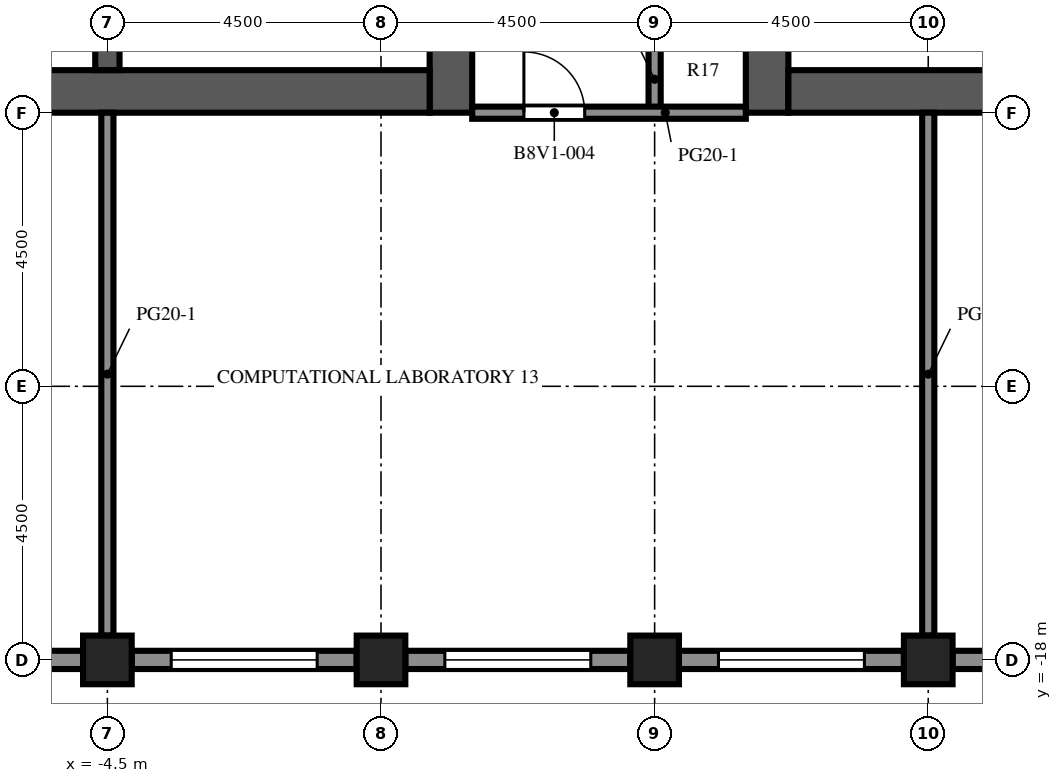
"""IFC4 building model, lengths in metres.
Left out: names, types, materials, properties, quantities, classifications, styles, units other than length and angle.
Written with IfcOpenShell. Run it as: python <this file> out.ifc"""

import sys

from ifc_helpers import new_model, si_unit, direction, frame, frame_2d, origin, origin_2d, place, context, subcontext, project, spatial, rectangle, extrude, element, fill, save


model = new_model("IFC4")
c1 = context("Model", 3, precision=1e-05, world=origin(), true_north=direction((0.0, 1.0)))
c2 = subcontext(c1, "Body", "Model", "MODEL_VIEW")
j1 = project(units=[si_unit("LENGTHUNIT", "METRE"), si_unit("PLANEANGLEUNIT", "RADIAN")], contexts=[c1])
p1 = place(None, origin())
s1 = spatial("IfcSite", under=j1, at=p1, CompositionType="ELEMENT")
p2 = place(p1, origin())
s2 = spatial("IfcBuilding", under=s1, at=p2, CompositionType="ELEMENT")
p3 = place(p2, frame((0.0, 0.0, 274.5)))
s3 = spatial("IfcBuildingStorey", under=s2, at=p3, CompositionType="ELEMENT", Elevation=274.5)
for number, where, z_axis, x_axis in (
    (1, (-4.5, -18.0, 0.0), (0.0, 0.0, 1.0), (1.0, 0.0, 0.0)),
    (2, (0.0, -18.0, 0.0), (0.0, 0.0, 1.0), (1.0, 0.0, 0.0)),
    (3, (4.5, -18.0, 0.0), (0.0, 0.0, 1.0), (1.0, 0.0, 0.0)),
    (4, (9.0, -18.0, 0.0), (0.0, 0.0, 1.0), (1.0, 0.0, 0.0)),
):
    element("IfcColumn", number, at=place(p3, frame(where, z_axis=z_axis, x_axis=x_axis)), inside=s3, PredefinedType="COLUMN", context=c2, shape_type="SweptSolid", body=[
        extrude(rectangle(XDim=0.8, YDim=0.8, at=origin_2d()), origin(), (0.0, 0.0, 1.0), 4.1),
    ])
p4 = place(p3, frame((1.15, -9.0, 0.0), z_axis=(0.0, 0.0, 1.0), x_axis=(0.0, 1.0, 0.0)))
e5 = element("IfcWall", 5, at=p4, inside=s3, PredefinedType="SHEAR", context=c2, shape_type="SweptSolid", body=[
    extrude(rectangle(XDim=27.5, YDim=0.7, at=frame_2d((13.75, 0.0))), origin(), (0.0, 0.0, 1.0), 4.1),
])
p5 = place(p4, frame((12.55, 0.0, 0.0)))
e6 = element("IfcOpeningElement", 6, at=p5, cuts=e5, PredefinedType="OPENING", context=c2, shape_type="SweptSolid", body=[
    extrude(rectangle(XDim=2.4, YDim=2.4, at=frame_2d((1.2, 1.2))), frame((0.0, 0.36, 0.0), z_axis=(0.0, -1.0, 0.0), x_axis=(1.0, 0.0, 0.0)), (0.0, 0.0, 1.0), 0.72),
])
p6 = place(p4, frame((3.9, 0.0, 0.0)))
e7 = element("IfcOpeningElement", 7, at=p6, cuts=e5, PredefinedType="OPENING", context=c2, shape_type="SweptSolid", body=[
    extrude(rectangle(XDim=1.2, YDim=2.1, at=frame_2d((0.6, 1.05))), frame((0.0, 0.36, 0.0), z_axis=(0.0, -1.0, 0.0), x_axis=(1.0, 0.0, 0.0)), (0.0, 0.0, 1.0), 0.72),
])
p7 = place(p4, frame((19.46, 0.0, 0.0)))
e8 = element("IfcOpeningElement", 8, at=p7, cuts=e5, PredefinedType="OPENING", context=c2, shape_type="SweptSolid", body=[
    extrude(rectangle(XDim=1.0, YDim=2.1, at=frame_2d((0.5, 1.05))), frame((0.0, 0.36, 0.0), z_axis=(0.0, -1.0, 0.0), x_axis=(1.0, 0.0, 0.0)), (0.0, 0.0, 1.0), 0.72),
])
p8 = place(p4, frame((21.17, 0.0, 0.0)))
e9 = element("IfcOpeningElement", 9, at=p8, cuts=e5, PredefinedType="OPENING", context=c2, shape_type="SweptSolid", body=[
    extrude(rectangle(XDim=1.0, YDim=2.1, at=frame_2d((0.5, 1.05))), frame((0.0, 0.36, 0.0), z_axis=(0.0, -1.0, 0.0), x_axis=(1.0, 0.0, 0.0)), (0.0, 0.0, 1.0), 0.72),
])
p9 = place(p4, frame((23.26, 0.0, 0.0)))
e10 = element("IfcOpeningElement", 10, at=p9, cuts=e5, PredefinedType="OPENING", context=c2, shape_type="SweptSolid", body=[
    extrude(rectangle(XDim=1.0, YDim=2.1, at=frame_2d((0.5, 1.05))), frame((0.0, 0.36, 0.0), z_axis=(0.0, -1.0, 0.0), x_axis=(1.0, 0.0, 0.0)), (0.0, 0.0, 1.0), 0.72),
])
p10 = place(p4, frame((25.35, 0.0, 0.0)))
e11 = element("IfcOpeningElement", 11, at=p10, cuts=e5, PredefinedType="OPENING", context=c2, shape_type="SweptSolid", body=[
    extrude(rectangle(XDim=1.0, YDim=2.1, at=frame_2d((0.5, 1.05))), frame((0.0, 0.36, 0.0), z_axis=(0.0, -1.0, 0.0), x_axis=(1.0, 0.0, 0.0)), (0.0, 0.0, 1.0), 0.72),
])
p11 = place(p3, frame((-9.8, -8.65, 0.0), z_axis=(0.0, 0.0, 1.0), x_axis=(1.0, 0.0, 0.0)))
e12 = element("IfcWall", 12, at=p11, inside=s3, PredefinedType="SHEAR", context=c2, shape_type="SweptSolid", body=[
    extrude(rectangle(XDim=10.6, YDim=0.7, at=frame_2d((5.3, 0.0))), origin(), (0.0, 0.0, 1.0), 4.1),
])
p12 = place(p3, frame((-4.5, -8.3, 0.0), z_axis=(0.0, 0.0, 1.0), x_axis=(0.0, 1.0, 0.0)))
e13 = element("IfcWall", 13, at=p12, inside=s3, PredefinedType="SHEAR", context=c2, shape_type="SweptSolid", body=[
    extrude(rectangle(XDim=7.6, YDim=0.4, at=frame_2d((3.8, 0.0))), origin(), (0.0, 0.0, 1.0), 4.1),
])
p13 = place(p3, frame((6.35, -9.0, 0.0), z_axis=(0.0, 0.0, 1.0), x_axis=(0.0, 1.0, 0.0)))
e14 = element("IfcWall", 14, at=p13, inside=s3, PredefinedType="SHEAR", context=c2, shape_type="SweptSolid", body=[
    extrude(rectangle(XDim=27.5, YDim=0.7, at=frame_2d((13.75, 0.0))), origin(), (0.0, 0.0, 1.0), 4.1),
])
p14 = place(p13, frame((12.55, 0.0, 0.0)))
e15 = element("IfcOpeningElement", 15, at=p14, cuts=e14, PredefinedType="OPENING", context=c2, shape_type="SweptSolid", body=[
    extrude(rectangle(XDim=2.4, YDim=2.4, at=frame_2d((1.2, 1.2))), frame((0.0, 0.36, 0.0), z_axis=(0.0, -1.0, 0.0), x_axis=(1.0, 0.0, 0.0)), (0.0, 0.0, 1.0), 0.72),
])
p15 = place(p13, frame((3.9, 0.0, 0.0)))
e16 = element("IfcOpeningElement", 16, at=p15, cuts=e14, PredefinedType="OPENING", context=c2, shape_type="SweptSolid", body=[
    extrude(rectangle(XDim=1.2, YDim=2.1, at=frame_2d((0.6, 1.05))), frame((0.0, 0.36, 0.0), z_axis=(0.0, -1.0, 0.0), x_axis=(1.0, 0.0, 0.0)), (0.0, 0.0, 1.0), 0.72),
])
p16 = place(p13, frame((19.46, 0.0, 0.0)))
e17 = element("IfcOpeningElement", 17, at=p16, cuts=e14, PredefinedType="OPENING", context=c2, shape_type="SweptSolid", body=[
    extrude(rectangle(XDim=1.0, YDim=2.1, at=frame_2d((0.5, 1.05))), frame((0.0, 0.36, 0.0), z_axis=(0.0, -1.0, 0.0), x_axis=(1.0, 0.0, 0.0)), (0.0, 0.0, 1.0), 0.72),
])
p17 = place(p13, frame((21.17, 0.0, 0.0)))
e18 = element("IfcOpeningElement", 18, at=p17, cuts=e14, PredefinedType="OPENING", context=c2, shape_type="SweptSolid", body=[
    extrude(rectangle(XDim=1.0, YDim=2.1, at=frame_2d((0.5, 1.05))), frame((0.0, 0.36, 0.0), z_axis=(0.0, -1.0, 0.0), x_axis=(1.0, 0.0, 0.0)), (0.0, 0.0, 1.0), 0.72),
])
p18 = place(p13, frame((23.26, 0.0, 0.0)))
e19 = element("IfcOpeningElement", 19, at=p18, cuts=e14, PredefinedType="OPENING", context=c2, shape_type="SweptSolid", body=[
    extrude(rectangle(XDim=1.0, YDim=2.1, at=frame_2d((0.5, 1.05))), frame((0.0, 0.36, 0.0), z_axis=(0.0, -1.0, 0.0), x_axis=(1.0, 0.0, 0.0)), (0.0, 0.0, 1.0), 0.72),
])
p19 = place(p13, frame((25.35, 0.0, 0.0)))
e20 = element("IfcOpeningElement", 20, at=p19, cuts=e14, PredefinedType="OPENING", context=c2, shape_type="SweptSolid", body=[
    extrude(rectangle(XDim=1.0, YDim=2.1, at=frame_2d((0.5, 1.05))), frame((0.0, 0.36, 0.0), z_axis=(0.0, -1.0, 0.0), x_axis=(1.0, 0.0, 0.0)), (0.0, 0.0, 1.0), 0.72),
])
p20 = place(p3, frame((6.7, -8.65, 0.0), z_axis=(0.0, 0.0, 1.0), x_axis=(1.0, 0.0, 0.0)))
e21 = element("IfcWall", 21, at=p20, inside=s3, PredefinedType="SHEAR", context=c2, shape_type="SweptSolid", body=[
    extrude(rectangle(XDim=10.6, YDim=0.7, at=frame_2d((5.3, 0.0))), origin(), (0.0, 0.0, 1.0), 4.1),
])
p21 = place(p3, frame((-4.9, -18.0, 0.0), z_axis=(0.0, 0.0, 1.0), x_axis=(-1.0, 0.0, 0.0)))
e22 = element("IfcWall", 22, at=p21, inside=s3, PredefinedType="SOLIDWALL", context=c2, shape_type="SweptSolid", body=[
    extrude(rectangle(XDim=3.7, YDim=0.3, at=frame_2d((1.85, 0.0))), origin(), (0.0, 0.0, 1.0), 2.85),
])
p22 = place(p21, frame((0.65, 0.0, 0.8)))
e23 = element("IfcOpeningElement", 23, at=p22, cuts=e22, PredefinedType="OPENING", context=c2, shape_type="SweptSolid", body=[
    extrude(rectangle(XDim=2.4, YDim=1.7, at=frame_2d((1.2, 0.85))), frame((0.0, 0.16, 0.0), z_axis=(0.0, -1.0, 0.0), x_axis=(1.0, 0.0, 0.0)), (0.0, 0.0, 1.0), 0.32),
])
p23 = place(p3, frame((-0.4, -18.0, 0.0), z_axis=(0.0, 0.0, 1.0), x_axis=(-1.0, 0.0, 0.0)))
e24 = element("IfcWall", 24, at=p23, inside=s3, PredefinedType="SOLIDWALL", context=c2, shape_type="SweptSolid", body=[
    extrude(rectangle(XDim=3.7, YDim=0.3, at=frame_2d((1.85, 0.0))), origin(), (0.0, 0.0, 1.0), 2.85),
])
p24 = place(p23, frame((0.65, 0.0, 0.8)))
e25 = element("IfcOpeningElement", 25, at=p24, cuts=e24, PredefinedType="OPENING", context=c2, shape_type="SweptSolid", body=[
    extrude(rectangle(XDim=2.4, YDim=1.7, at=frame_2d((1.2, 0.85))), frame((0.0, 0.16, 0.0), z_axis=(0.0, -1.0, 0.0), x_axis=(1.0, 0.0, 0.0)), (0.0, 0.0, 1.0), 0.32),
])
p25 = place(p3, frame((4.1, -18.0, 0.0), z_axis=(0.0, 0.0, 1.0), x_axis=(-1.0, 0.0, 0.0)))
e26 = element("IfcWall", 26, at=p25, inside=s3, PredefinedType="SOLIDWALL", context=c2, shape_type="SweptSolid", body=[
    extrude(rectangle(XDim=3.7, YDim=0.3, at=frame_2d((1.85, 0.0))), origin(), (0.0, 0.0, 1.0), 2.85),
])
p26 = place(p25, frame((0.65, 0.0, 0.8)))
e27 = element("IfcOpeningElement", 27, at=p26, cuts=e26, PredefinedType="OPENING", context=c2, shape_type="SweptSolid", body=[
    extrude(rectangle(XDim=2.4, YDim=1.7, at=frame_2d((1.2, 0.85))), frame((0.0, 0.16, 0.0), z_axis=(0.0, -1.0, 0.0), x_axis=(1.0, 0.0, 0.0)), (0.0, 0.0, 1.0), 0.32),
])
p27 = place(p3, frame((8.6, -18.0, 0.0), z_axis=(0.0, 0.0, 1.0), x_axis=(-1.0, 0.0, 0.0)))
e28 = element("IfcWall", 28, at=p27, inside=s3, PredefinedType="SOLIDWALL", context=c2, shape_type="SweptSolid", body=[
    extrude(rectangle(XDim=3.7, YDim=0.3, at=frame_2d((1.85, 0.0))), origin(), (0.0, 0.0, 1.0), 2.85),
])
p28 = place(p27, frame((0.65, 0.0, 0.8)))
e29 = element("IfcOpeningElement", 29, at=p28, cuts=e28, PredefinedType="OPENING", context=c2, shape_type="SweptSolid", body=[
    extrude(rectangle(XDim=2.4, YDim=1.7, at=frame_2d((1.2, 0.85))), frame((0.0, 0.16, 0.0), z_axis=(0.0, -1.0, 0.0), x_axis=(1.0, 0.0, 0.0)), (0.0, 0.0, 1.0), 0.32),
])
p29 = place(p3, frame((13.1, -18.0, 0.0), z_axis=(0.0, 0.0, 1.0), x_axis=(-1.0, 0.0, 0.0)))
e30 = element("IfcWall", 30, at=p29, inside=s3, PredefinedType="SOLIDWALL", context=c2, shape_type="SweptSolid", body=[
    extrude(rectangle(XDim=3.7, YDim=0.3, at=frame_2d((1.85, 0.0))), origin(), (0.0, 0.0, 1.0), 2.85),
])
p30 = place(p29, frame((1.35, 0.0, 0.0)))
e31 = element("IfcOpeningElement", 31, at=p30, cuts=e30, PredefinedType="OPENING", context=c2, shape_type="SweptSolid", body=[
    extrude(rectangle(XDim=1.0, YDim=2.2, at=frame_2d((0.5, 1.1))), frame((0.0, 0.16, 0.0), z_axis=(0.0, -1.0, 0.0), x_axis=(1.0, 0.0, 0.0)), (0.0, 0.0, 1.0), 0.32),
])
p31 = place(p3, frame((-4.5, -17.6, 0.0), z_axis=(0.0, 0.0, 1.0), x_axis=(0.0, 1.0, 0.0)))
e32 = element("IfcWall", 32, at=p31, inside=s3, PredefinedType="PARTITIONING", context=c2, shape_type="SweptSolid", body=[
    extrude(rectangle(XDim=8.6, YDim=0.2, at=frame_2d((4.3, 0.0))), origin(), (0.0, 0.0, 1.0), 3.65),
])
p32 = place(p3, frame((4.5, -6.0, 0.0), z_axis=(0.0, 0.0, 1.0), x_axis=(0.0, -1.0, 0.0)))
e33 = element("IfcWall", 33, at=p32, inside=s3, PredefinedType="PARTITIONING", context=c2, shape_type="SweptSolid", body=[
    extrude(rectangle(XDim=3.0, YDim=0.2, at=frame_2d((1.5, 0.0))), origin(), (0.0, 0.0, 1.0), 3.65),
])
p33 = place(p32, frame((0.9, 0.0, 0.0)))
e34 = element("IfcOpeningElement", 34, at=p33, cuts=e33, PredefinedType="OPENING", context=c2, shape_type="SweptSolid", body=[
    extrude(rectangle(XDim=1.0, YDim=2.1, at=frame_2d((0.5, 1.05))), frame((0.0, 0.11, 0.0), z_axis=(0.0, -1.0, 0.0), x_axis=(1.0, 0.0, 0.0)), (0.0, 0.0, 1.0), 0.22),
])
p34 = place(p3, frame((9.0, -17.6, 0.0), z_axis=(0.0, 0.0, 1.0), x_axis=(0.0, 1.0, 0.0)))
e35 = element("IfcWall", 35, at=p34, inside=s3, PredefinedType="PARTITIONING", context=c2, shape_type="SweptSolid", body=[
    extrude(rectangle(XDim=8.6, YDim=0.2, at=frame_2d((4.3, 0.0))), origin(), (0.0, 0.0, 1.0), 3.65),
])
p35 = place(p3, frame((6.0, -9.0, 0.0), z_axis=(0.0, 0.0, 1.0), x_axis=(-1.0, 0.0, 0.0)))
e36 = element("IfcWall", 36, at=p35, inside=s3, PredefinedType="PARTITIONING", context=c2, shape_type="SweptSolid", body=[
    extrude(rectangle(XDim=4.5, YDim=0.2, at=frame_2d((2.25, 0.0))), origin(), (0.0, 0.0, 1.0), 3.65),
])
p36 = place(p35, frame((2.65, 0.0, 0.0)))
e37 = element("IfcOpeningElement", 37, at=p36, cuts=e36, PredefinedType="OPENING", context=c2, shape_type="SweptSolid", body=[
    extrude(rectangle(XDim=1.0, YDim=2.1, at=frame_2d((0.5, 1.05))), frame((0.0, 0.11, 0.0), z_axis=(0.0, -1.0, 0.0), x_axis=(1.0, 0.0, 0.0)), (0.0, 0.0, 1.0), 0.22),
])
p37 = place(p24, origin())
e38 = element("IfcWindow", 38, at=p37, inside=s3, PartitioningType="SINGLE_PANEL", PredefinedType="WINDOW", context=c2, shape_type="SweptSolid", body=[
    extrude(rectangle(XDim=2.4, YDim=1.7, at=frame_2d((1.2, 0.85))), frame((0.0, 0.03, 0.0), z_axis=(0.0, -1.0, 0.0), x_axis=(1.0, 0.0, 0.0)), (0.0, 0.0, 1.0), 0.06),
])
fill(e25, e38)
p38 = place(p26, origin())
e39 = element("IfcWindow", 39, at=p38, inside=s3, PartitioningType="SINGLE_PANEL", PredefinedType="WINDOW", context=c2, shape_type="SweptSolid", body=[
    extrude(rectangle(XDim=2.4, YDim=1.7, at=frame_2d((1.2, 0.85))), frame((0.0, 0.03, 0.0), z_axis=(0.0, -1.0, 0.0), x_axis=(1.0, 0.0, 0.0)), (0.0, 0.0, 1.0), 0.06),
])
fill(e27, e39)
p39 = place(p28, origin())
e40 = element("IfcWindow", 40, at=p39, inside=s3, PartitioningType="SINGLE_PANEL", PredefinedType="WINDOW", context=c2, shape_type="SweptSolid", body=[
    extrude(rectangle(XDim=2.4, YDim=1.7, at=frame_2d((1.2, 0.85))), frame((0.0, 0.03, 0.0), z_axis=(0.0, -1.0, 0.0), x_axis=(1.0, 0.0, 0.0)), (0.0, 0.0, 1.0), 0.06),
])
fill(e29, e40)
p40 = place(p36, origin())
e41 = element("IfcDoor", 41, at=p40, inside=s3, OperationType="SINGLE_SWING_RIGHT", PredefinedType="DOOR", context=c2, shape_type="SweptSolid", body=[
    extrude(rectangle(XDim=1.0, YDim=2.1, at=frame_2d((0.5, 1.05))), frame((0.0, 0.025, 0.0), z_axis=(0.0, -1.0, 0.0), x_axis=(1.0, 0.0, 0.0)), (0.0, 0.0, 1.0), 0.05),
])
fill(e37, e41)
save(model, sys.argv[1])
